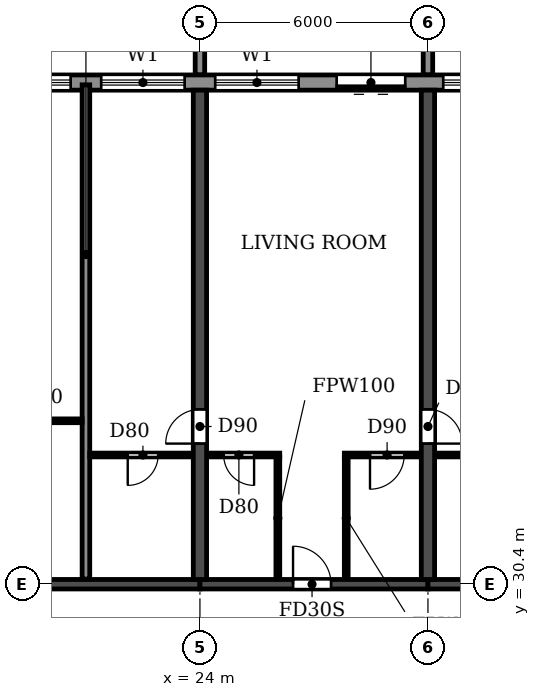
"""IFC4 building model, lengths in metres.
Left out: names, types, materials, properties, quantities, classifications, styles, units other than length and angle.
Written with IfcOpenShell. Run it as: python <this file> out.ifc"""

import sys

from ifc_helpers import new_model, si_unit, direction, frame, frame_2d, origin, place, context, subcontext, project, spatial, polyline, rectangle, outline, extrude, source, transform, mapped, element, fill, save


model = new_model("IFC4")
c1 = context("Model", 3, precision=1e-05, world=origin(), true_north=direction((0.0, 1.0)))
c2 = subcontext(c1, "Body", "Model", "MODEL_VIEW")
j1 = project(units=[si_unit("LENGTHUNIT", "METRE"), si_unit("PLANEANGLEUNIT", "RADIAN")], contexts=[c1])
p1 = place(None, origin())
s1 = spatial("IfcSite", under=j1, at=p1, CompositionType="ELEMENT")
p2 = place(p1, origin())
s2 = spatial("IfcBuilding", under=s1, at=p2, CompositionType="ELEMENT")
p3 = place(p2, frame((0.0, 0.0, 92.7)))
s3 = spatial("IfcBuildingStorey", under=s2, at=p3, CompositionType="ELEMENT", Elevation=92.7)
p4 = place(p3, frame((24.0, 30.525, 0.0), z_axis=(0.0, 0.0, 1.0), x_axis=(0.0, 1.0, 0.0)))
e1 = element("IfcWall", 1, at=p4, inside=s3, PredefinedType="SHEAR", context=c2, shape_type="SweptSolid", body=[
    extrude(rectangle(XDim=12.875, YDim=0.35, at=frame_2d((6.438, 0.0))), origin(), (0.0, 0.0, 1.0), 3.06),
])
p5 = place(p4, frame((3.575, 0.0, 0.0)))
e2 = element("IfcOpeningElement", 2, at=p5, cuts=e1, PredefinedType="OPENING", context=c2, shape_type="SweptSolid", body=[
    extrude(rectangle(XDim=0.9, YDim=2.1, at=frame_2d((0.45, 1.05))), frame((0.0, 0.185, 0.0), z_axis=(0.0, -1.0, 0.0), x_axis=(1.0, 0.0, 0.0)), (0.0, 0.0, 1.0), 0.37),
])
p6 = place(p3, frame((30.0, 30.525, 0.0), z_axis=(0.0, 0.0, 1.0), x_axis=(0.0, 1.0, 0.0)))
e3 = element("IfcWall", 3, at=p6, inside=s3, PredefinedType="SHEAR", context=c2, shape_type="SweptSolid", body=[
    extrude(rectangle(XDim=12.875, YDim=0.35, at=frame_2d((6.438, 0.0))), origin(), (0.0, 0.0, 1.0), 3.06),
])
p7 = place(p6, frame((3.575, 0.0, 0.0)))
e4 = element("IfcOpeningElement", 4, at=p7, cuts=e3, PredefinedType="OPENING", context=c2, shape_type="SweptSolid", body=[
    extrude(rectangle(XDim=0.9, YDim=2.1, at=frame_2d((0.45, 1.05))), frame((0.0, 0.185, 0.0), z_axis=(0.0, -1.0, 0.0), x_axis=(1.0, 0.0, 0.0)), (0.0, 0.0, 1.0), 0.37),
])
p8 = place(p3, frame((18.0, 30.4, 0.0), z_axis=(0.0, 0.0, 1.0), x_axis=(1.0, 0.0, 0.0)))
e5 = element("IfcWall", 5, at=p8, inside=s3, PredefinedType="SHEAR", context=c2, shape_type="SweptSolid", body=[
    extrude(rectangle(XDim=6.0, YDim=0.25, at=frame_2d((3.0, 0.0))), origin(), (0.0, 0.0, 1.0), 2.46),
])
p9 = place(p3, frame((24.0, 30.4, 0.0), z_axis=(0.0, 0.0, 1.0), x_axis=(1.0, 0.0, 0.0)))
e6 = element("IfcWall", 6, at=p9, inside=s3, PredefinedType="SHEAR", context=c2, shape_type="SweptSolid", body=[
    extrude(rectangle(XDim=6.0, YDim=0.25, at=frame_2d((3.0, 0.0))), origin(), (0.0, 0.0, 1.0), 2.46),
])
p10 = place(p9, frame((2.45, 0.0, 0.0)))
e7 = element("IfcOpeningElement", 7, at=p10, cuts=e6, PredefinedType="OPENING", context=c2, shape_type="SweptSolid", body=[
    extrude(rectangle(XDim=1.0, YDim=2.1, at=frame_2d((0.5, 1.05))), frame((0.0, 0.135, 0.0), z_axis=(0.0, -1.0, 0.0), x_axis=(1.0, 0.0, 0.0)), (0.0, 0.0, 1.0), 0.27),
])
p11 = place(p3, frame((30.0, 30.4, 0.0), z_axis=(0.0, 0.0, 1.0), x_axis=(1.0, 0.0, 0.0)))
e8 = element("IfcWall", 8, at=p11, inside=s3, PredefinedType="SHEAR", context=c2, shape_type="SweptSolid", body=[
    extrude(rectangle(XDim=6.0, YDim=0.25, at=frame_2d((3.0, 0.0))), origin(), (0.0, 0.0, 1.0), 2.46),
])
p12 = place(p3, frame((91.317, 43.6, 0.0), z_axis=(0.0, 0.0, 1.0), x_axis=(-1.0, 0.0, 0.0)))
e9 = element("IfcWall", 9, at=p12, inside=s3, PredefinedType="STANDARD", context=c2, shape_type="SweptSolid", body=[
    extrude(rectangle(XDim=80.634, YDim=0.4, at=frame_2d((40.317, 0.0))), origin(), (0.0, 0.0, 1.0), 3.06),
])
p13 = place(p12, frame((76.717, 0.0, 0.9)))
e10 = element("IfcOpeningElement", 10, at=p13, cuts=e9, PredefinedType="OPENING", context=c2, shape_type="SweptSolid", body=[
    extrude(rectangle(XDim=2.2, YDim=1.5, at=frame_2d((1.1, 0.75))), frame((0.0, 0.21, 0.0), z_axis=(0.0, -1.0, 0.0), x_axis=(1.0, 0.0, 0.0)), (0.0, 0.0, 1.0), 0.42),
])
p14 = place(p12, frame((73.917, 0.0, 0.0)))
e11 = element("IfcOpeningElement", 11, at=p14, cuts=e9, PredefinedType="OPENING", context=c2, shape_type="SweptSolid", body=[
    extrude(rectangle(XDim=1.8, YDim=2.4, at=frame_2d((0.9, 1.2))), frame((0.0, 0.21, 0.0), z_axis=(0.0, -1.0, 0.0), x_axis=(1.0, 0.0, 0.0)), (0.0, 0.0, 1.0), 0.42),
])
p15 = place(p12, frame((70.717, 0.0, 0.9)))
e12 = element("IfcOpeningElement", 12, at=p15, cuts=e9, PredefinedType="OPENING", context=c2, shape_type="SweptSolid", body=[
    extrude(rectangle(XDim=2.2, YDim=1.5, at=frame_2d((1.1, 0.75))), frame((0.0, 0.21, 0.0), z_axis=(0.0, -1.0, 0.0), x_axis=(1.0, 0.0, 0.0)), (0.0, 0.0, 1.0), 0.42),
])
p16 = place(p12, frame((67.717, 0.0, 0.9)))
e13 = element("IfcOpeningElement", 13, at=p16, cuts=e9, PredefinedType="OPENING", context=c2, shape_type="SweptSolid", body=[
    extrude(rectangle(XDim=2.2, YDim=1.5, at=frame_2d((1.1, 0.75))), frame((0.0, 0.21, 0.0), z_axis=(0.0, -1.0, 0.0), x_axis=(1.0, 0.0, 0.0)), (0.0, 0.0, 1.0), 0.42),
])
p17 = place(p12, frame((64.717, 0.0, 0.9)))
e14 = element("IfcOpeningElement", 14, at=p17, cuts=e9, PredefinedType="OPENING", context=c2, shape_type="SweptSolid", body=[
    extrude(rectangle(XDim=2.2, YDim=1.5, at=frame_2d((1.1, 0.75))), frame((0.0, 0.21, 0.0), z_axis=(0.0, -1.0, 0.0), x_axis=(1.0, 0.0, 0.0)), (0.0, 0.0, 1.0), 0.42),
])
p18 = place(p12, frame((61.917, 0.0, 0.0)))
e15 = element("IfcOpeningElement", 15, at=p18, cuts=e9, PredefinedType="OPENING", context=c2, shape_type="SweptSolid", body=[
    extrude(rectangle(XDim=1.8, YDim=2.4, at=frame_2d((0.9, 1.2))), frame((0.0, 0.21, 0.0), z_axis=(0.0, -1.0, 0.0), x_axis=(1.0, 0.0, 0.0)), (0.0, 0.0, 1.0), 0.42),
])
p19 = place(p12, frame((58.717, 0.0, 0.9)))
e16 = element("IfcOpeningElement", 16, at=p19, cuts=e9, PredefinedType="OPENING", context=c2, shape_type="SweptSolid", body=[
    extrude(rectangle(XDim=2.2, YDim=1.5, at=frame_2d((1.1, 0.75))), frame((0.0, 0.21, 0.0), z_axis=(0.0, -1.0, 0.0), x_axis=(1.0, 0.0, 0.0)), (0.0, 0.0, 1.0), 0.42),
])
p20 = place(p12, frame((55.717, 0.0, 0.9)))
e17 = element("IfcOpeningElement", 17, at=p20, cuts=e9, PredefinedType="OPENING", context=c2, shape_type="SweptSolid", body=[
    extrude(rectangle(XDim=2.2, YDim=1.5, at=frame_2d((1.1, 0.75))), frame((0.0, 0.21, 0.0), z_axis=(0.0, -1.0, 0.0), x_axis=(1.0, 0.0, 0.0)), (0.0, 0.0, 1.0), 0.42),
])
p21 = place(p12, frame((52.917, 0.0, 0.0)))
e18 = element("IfcOpeningElement", 18, at=p21, cuts=e9, PredefinedType="OPENING", context=c2, shape_type="SweptSolid", body=[
    extrude(rectangle(XDim=1.8, YDim=2.4, at=frame_2d((0.9, 1.2))), frame((0.0, 0.21, 0.0), z_axis=(0.0, -1.0, 0.0), x_axis=(1.0, 0.0, 0.0)), (0.0, 0.0, 1.0), 0.42),
])
p22 = place(p12, frame((49.717, 0.0, 0.9)))
e19 = element("IfcOpeningElement", 19, at=p22, cuts=e9, PredefinedType="OPENING", context=c2, shape_type="SweptSolid", body=[
    extrude(rectangle(XDim=2.2, YDim=1.5, at=frame_2d((1.1, 0.75))), frame((0.0, 0.21, 0.0), z_axis=(0.0, -1.0, 0.0), x_axis=(1.0, 0.0, 0.0)), (0.0, 0.0, 1.0), 0.42),
])
p23 = place(p12, frame((46.717, 0.0, 0.9)))
e20 = element("IfcOpeningElement", 20, at=p23, cuts=e9, PredefinedType="OPENING", context=c2, shape_type="SweptSolid", body=[
    extrude(rectangle(XDim=2.2, YDim=1.5, at=frame_2d((1.1, 0.75))), frame((0.0, 0.21, 0.0), z_axis=(0.0, -1.0, 0.0), x_axis=(1.0, 0.0, 0.0)), (0.0, 0.0, 1.0), 0.42),
])
p24 = place(p12, frame((43.717, 0.0, 0.9)))
e21 = element("IfcOpeningElement", 21, at=p24, cuts=e9, PredefinedType="OPENING", context=c2, shape_type="SweptSolid", body=[
    extrude(rectangle(XDim=2.2, YDim=1.5, at=frame_2d((1.1, 0.75))), frame((0.0, 0.21, 0.0), z_axis=(0.0, -1.0, 0.0), x_axis=(1.0, 0.0, 0.0)), (0.0, 0.0, 1.0), 0.42),
])
p25 = place(p12, frame((40.717, 0.0, 0.9)))
e22 = element("IfcOpeningElement", 22, at=p25, cuts=e9, PredefinedType="OPENING", context=c2, shape_type="SweptSolid", body=[
    extrude(rectangle(XDim=2.2, YDim=1.5, at=frame_2d((1.1, 0.75))), frame((0.0, 0.21, 0.0), z_axis=(0.0, -1.0, 0.0), x_axis=(1.0, 0.0, 0.0)), (0.0, 0.0, 1.0), 0.42),
])
p26 = place(p12, frame((37.917, 0.0, 0.0)))
e23 = element("IfcOpeningElement", 23, at=p26, cuts=e9, PredefinedType="OPENING", context=c2, shape_type="SweptSolid", body=[
    extrude(rectangle(XDim=1.8, YDim=2.4, at=frame_2d((0.9, 1.2))), frame((0.0, 0.21, 0.0), z_axis=(0.0, -1.0, 0.0), x_axis=(1.0, 0.0, 0.0)), (0.0, 0.0, 1.0), 0.42),
])
p27 = place(p12, frame((34.917, 0.0, 0.0)))
e24 = element("IfcOpeningElement", 24, at=p27, cuts=e9, PredefinedType="OPENING", context=c2, shape_type="SweptSolid", body=[
    extrude(rectangle(XDim=1.8, YDim=2.4, at=frame_2d((0.9, 1.2))), frame((0.0, 0.21, 0.0), z_axis=(0.0, -1.0, 0.0), x_axis=(1.0, 0.0, 0.0)), (0.0, 0.0, 1.0), 0.42),
])
p28 = place(p12, frame((31.717, 0.0, 0.9)))
e25 = element("IfcOpeningElement", 25, at=p28, cuts=e9, PredefinedType="OPENING", context=c2, shape_type="SweptSolid", body=[
    extrude(rectangle(XDim=2.2, YDim=1.5, at=frame_2d((1.1, 0.75))), frame((0.0, 0.21, 0.0), z_axis=(0.0, -1.0, 0.0), x_axis=(1.0, 0.0, 0.0)), (0.0, 0.0, 1.0), 0.42),
])
p29 = place(p12, frame((28.717, 0.0, 0.9)))
e26 = element("IfcOpeningElement", 26, at=p29, cuts=e9, PredefinedType="OPENING", context=c2, shape_type="SweptSolid", body=[
    extrude(rectangle(XDim=2.2, YDim=1.5, at=frame_2d((1.1, 0.75))), frame((0.0, 0.21, 0.0), z_axis=(0.0, -1.0, 0.0), x_axis=(1.0, 0.0, 0.0)), (0.0, 0.0, 1.0), 0.42),
])
p30 = place(p12, frame((25.717, 0.0, 0.9)))
e27 = element("IfcOpeningElement", 27, at=p30, cuts=e9, PredefinedType="OPENING", context=c2, shape_type="SweptSolid", body=[
    extrude(rectangle(XDim=2.2, YDim=1.5, at=frame_2d((1.1, 0.75))), frame((0.0, 0.21, 0.0), z_axis=(0.0, -1.0, 0.0), x_axis=(1.0, 0.0, 0.0)), (0.0, 0.0, 1.0), 0.42),
])
p31 = place(p12, frame((22.717, 0.0, 0.9)))
e28 = element("IfcOpeningElement", 28, at=p31, cuts=e9, PredefinedType="OPENING", context=c2, shape_type="SweptSolid", body=[
    extrude(rectangle(XDim=2.2, YDim=1.5, at=frame_2d((1.1, 0.75))), frame((0.0, 0.21, 0.0), z_axis=(0.0, -1.0, 0.0), x_axis=(1.0, 0.0, 0.0)), (0.0, 0.0, 1.0), 0.42),
])
p32 = place(p12, frame((19.917, 0.0, 0.0)))
e29 = element("IfcOpeningElement", 29, at=p32, cuts=e9, PredefinedType="OPENING", context=c2, shape_type="SweptSolid", body=[
    extrude(rectangle(XDim=1.8, YDim=2.4, at=frame_2d((0.9, 1.2))), frame((0.0, 0.21, 0.0), z_axis=(0.0, -1.0, 0.0), x_axis=(1.0, 0.0, 0.0)), (0.0, 0.0, 1.0), 0.42),
])
p33 = place(p12, frame((16.717, 0.0, 0.9)))
e30 = element("IfcOpeningElement", 30, at=p33, cuts=e9, PredefinedType="OPENING", context=c2, shape_type="SweptSolid", body=[
    extrude(rectangle(XDim=2.2, YDim=1.5, at=frame_2d((1.1, 0.75))), frame((0.0, 0.21, 0.0), z_axis=(0.0, -1.0, 0.0), x_axis=(1.0, 0.0, 0.0)), (0.0, 0.0, 1.0), 0.42),
])
p34 = place(p12, frame((13.917, 0.0, 0.0)))
e31 = element("IfcOpeningElement", 31, at=p34, cuts=e9, PredefinedType="OPENING", context=c2, shape_type="SweptSolid", body=[
    extrude(rectangle(XDim=1.8, YDim=2.4, at=frame_2d((0.9, 1.2))), frame((0.0, 0.21, 0.0), z_axis=(0.0, -1.0, 0.0), x_axis=(1.0, 0.0, 0.0)), (0.0, 0.0, 1.0), 0.42),
])
p35 = place(p12, frame((10.717, 0.0, 0.9)))
e32 = element("IfcOpeningElement", 32, at=p35, cuts=e9, PredefinedType="OPENING", context=c2, shape_type="SweptSolid", body=[
    extrude(rectangle(XDim=2.2, YDim=1.5, at=frame_2d((1.1, 0.75))), frame((0.0, 0.21, 0.0), z_axis=(0.0, -1.0, 0.0), x_axis=(1.0, 0.0, 0.0)), (0.0, 0.0, 1.0), 0.42),
])
p36 = place(p12, frame((7.917, 0.0, 0.0)))
e33 = element("IfcOpeningElement", 33, at=p36, cuts=e9, PredefinedType="OPENING", context=c2, shape_type="SweptSolid", body=[
    extrude(rectangle(XDim=1.8, YDim=2.4, at=frame_2d((0.9, 1.2))), frame((0.0, 0.21, 0.0), z_axis=(0.0, -1.0, 0.0), x_axis=(1.0, 0.0, 0.0)), (0.0, 0.0, 1.0), 0.42),
])
p37 = place(p12, frame((4.717, 0.0, 0.9)))
e34 = element("IfcOpeningElement", 34, at=p37, cuts=e9, PredefinedType="OPENING", context=c2, shape_type="SweptSolid", body=[
    extrude(rectangle(XDim=2.2, YDim=1.5, at=frame_2d((1.1, 0.75))), frame((0.0, 0.21, 0.0), z_axis=(0.0, -1.0, 0.0), x_axis=(1.0, 0.0, 0.0)), (0.0, 0.0, 1.0), 0.42),
])
p38 = place(p12, frame((1.917, 0.0, 0.0)))
e35 = element("IfcOpeningElement", 35, at=p38, cuts=e9, PredefinedType="OPENING", context=c2, shape_type="SweptSolid", body=[
    extrude(rectangle(XDim=1.8, YDim=2.4, at=frame_2d((0.9, 1.2))), frame((0.0, 0.21, 0.0), z_axis=(0.0, -1.0, 0.0), x_axis=(1.0, 0.0, 0.0)), (0.0, 0.0, 1.0), 0.42),
])
m1 = source(origin(), c2, "Body", "SweptSolid", [
    extrude(outline(polyline([(0.0, 0.0), (0.25, 0.0), (0.25, 3.1), (0.0, 3.1), (0.0, 0.0)])), origin(), (0.0, 0.0, 1.0), 3.1),
])
for number, where in (
    (36, (23.875, 43.8, 0.0)),
    (37, (29.875, 43.8, 0.0)),
):
    element("IfcWall", number, at=place(p3, frame(where)), inside=s3, PredefinedType="STANDARD", context=c2, shape_type="MappedRepresentation", body=[
        mapped(m1, transform((0.0, 0.0, 0.0))),
    ])
p39 = place(p3, frame((21.0, 30.535, 0.0), z_axis=(0.0, 0.0, 1.0), x_axis=(0.0, 1.0, 0.0)))
e38 = element("IfcWall", 38, at=p39, inside=s3, PredefinedType="PARTITIONING", context=c2, shape_type="SweptSolid", body=[
    extrude(rectangle(XDim=13.005, YDim=0.2, at=frame_2d((6.502, 0.0))), origin(), (0.0, 0.0, 1.0), 3.06),
])
p40 = place(p3, frame((21.1, 33.8, 0.0), z_axis=(0.0, 0.0, 1.0), x_axis=(1.0, 0.0, 0.0)))
e39 = element("IfcWall", 39, at=p40, inside=s3, PredefinedType="PARTITIONING", context=c2, shape_type="SweptSolid", body=[
    extrude(rectangle(XDim=2.715, YDim=0.1, at=frame_2d((1.357, 0.0))), origin(), (0.0, 0.0, 1.0), 3.06),
])
p41 = place(p40, frame((1.0, 0.0, 0.0)))
e40 = element("IfcOpeningElement", 40, at=p41, cuts=e39, PredefinedType="OPENING", context=c2, shape_type="SweptSolid", body=[
    extrude(rectangle(XDim=0.8, YDim=2.1, at=frame_2d((0.4, 1.05))), frame((0.0, 0.06, 0.0), z_axis=(0.0, -1.0, 0.0), x_axis=(1.0, 0.0, 0.0)), (0.0, 0.0, 1.0), 0.12),
])
p42 = place(p3, frame((24.185, 33.8, 0.0), z_axis=(0.0, 0.0, 1.0), x_axis=(1.0, 0.0, 0.0)))
e41 = element("IfcWall", 41, at=p42, inside=s3, PredefinedType="PARTITIONING", context=c2, shape_type="SweptSolid", body=[
    extrude(rectangle(XDim=1.915, YDim=0.1, at=frame_2d((0.958, 0.0))), origin(), (0.0, 0.0, 1.0), 3.06),
])
p43 = place(p42, frame((0.44, 0.0, 0.0)))
e42 = element("IfcOpeningElement", 42, at=p43, cuts=e41, PredefinedType="OPENING", context=c2, shape_type="SweptSolid", body=[
    extrude(rectangle(XDim=0.8, YDim=2.1, at=frame_2d((0.4, 1.05))), frame((0.0, 0.06, 0.0), z_axis=(0.0, -1.0, 0.0), x_axis=(1.0, 0.0, 0.0)), (0.0, 0.0, 1.0), 0.12),
])
p44 = place(p3, frame((27.8, 33.8, 0.0), z_axis=(0.0, 0.0, 1.0), x_axis=(1.0, 0.0, 0.0)))
e43 = element("IfcWall", 43, at=p44, inside=s3, PredefinedType="PARTITIONING", context=c2, shape_type="SweptSolid", body=[
    extrude(rectangle(XDim=2.015, YDim=0.1, at=frame_2d((1.007, 0.0))), origin(), (0.0, 0.0, 1.0), 3.06),
])
p45 = place(p44, frame((0.675, 0.0, 0.0)))
e44 = element("IfcOpeningElement", 44, at=p45, cuts=e43, PredefinedType="OPENING", context=c2, shape_type="SweptSolid", body=[
    extrude(rectangle(XDim=0.9, YDim=2.1, at=frame_2d((0.45, 1.05))), frame((0.0, 0.06, 0.0), z_axis=(0.0, -1.0, 0.0), x_axis=(1.0, 0.0, 0.0)), (0.0, 0.0, 1.0), 0.12),
])
p46 = place(p3, frame((30.185, 33.8, 0.0), z_axis=(0.0, 0.0, 1.0), x_axis=(1.0, 0.0, 0.0)))
e45 = element("IfcWall", 45, at=p46, inside=s3, PredefinedType="PARTITIONING", context=c2, shape_type="SweptSolid", body=[
    extrude(rectangle(XDim=2.715, YDim=0.1, at=frame_2d((1.357, 0.0))), origin(), (0.0, 0.0, 1.0), 3.06),
])
p47 = place(p46, frame((0.915, 0.0, 0.0)))
e46 = element("IfcOpeningElement", 46, at=p47, cuts=e45, PredefinedType="OPENING", context=c2, shape_type="SweptSolid", body=[
    extrude(rectangle(XDim=0.8, YDim=2.1, at=frame_2d((0.4, 1.05))), frame((0.0, 0.06, 0.0), z_axis=(0.0, -1.0, 0.0), x_axis=(1.0, 0.0, 0.0)), (0.0, 0.0, 1.0), 0.12),
])
p48 = place(p3, frame((18.185, 34.7, 0.0), z_axis=(0.0, 0.0, 1.0), x_axis=(1.0, 0.0, 0.0)))
e47 = element("IfcWall", 47, at=p48, inside=s3, PredefinedType="PARTITIONING", context=c2, shape_type="SweptSolid", body=[
    extrude(rectangle(XDim=2.715, YDim=0.1, at=frame_2d((1.357, 0.0))), origin(), (0.0, 0.0, 1.0), 3.06),
])
p49 = place(p48, frame((0.915, 0.0, 0.0)))
e48 = element("IfcOpeningElement", 48, at=p49, cuts=e47, PredefinedType="OPENING", context=c2, shape_type="SweptSolid", body=[
    extrude(rectangle(XDim=0.8, YDim=2.1, at=frame_2d((0.4, 1.05))), frame((0.0, 0.06, 0.0), z_axis=(0.0, -1.0, 0.0), x_axis=(1.0, 0.0, 0.0)), (0.0, 0.0, 1.0), 0.12),
])
for number, where, z_axis, x_axis in (
    (49, (26.05, 30.535, 0.0), (0.0, 0.0, 1.0), (0.0, 1.0, 0.0)),
    (50, (27.85, 30.535, 0.0), (0.0, 0.0, 1.0), (0.0, 1.0, 0.0)),
):
    element("IfcWall", number, at=place(p3, frame(where, z_axis=z_axis, x_axis=x_axis)), inside=s3, PredefinedType="PARTITIONING", context=c2, shape_type="SweptSolid", body=[
        extrude(rectangle(XDim=3.215, YDim=0.1, at=frame_2d((1.607, 0.0))), origin(), (0.0, 0.0, 1.0), 3.06),
    ])
p50 = place(p15, origin())
e51 = element("IfcWindow", 51, at=p50, inside=s3, PartitioningType="DOUBLE_PANEL_HORIZONTAL", PredefinedType="WINDOW", context=c2, shape_type="SweptSolid", body=[
    extrude(rectangle(XDim=2.2, YDim=1.5, at=frame_2d((1.1, 0.75))), frame((0.0, 0.03, 0.0), z_axis=(0.0, -1.0, 0.0), x_axis=(1.0, 0.0, 0.0)), (0.0, 0.0, 1.0), 0.06),
])
fill(e12, e51)
p51 = place(p16, origin())
e52 = element("IfcWindow", 52, at=p51, inside=s3, PartitioningType="DOUBLE_PANEL_HORIZONTAL", PredefinedType="WINDOW", context=c2, shape_type="SweptSolid", body=[
    extrude(rectangle(XDim=2.2, YDim=1.5, at=frame_2d((1.1, 0.75))), frame((0.0, 0.03, 0.0), z_axis=(0.0, -1.0, 0.0), x_axis=(1.0, 0.0, 0.0)), (0.0, 0.0, 1.0), 0.06),
])
fill(e13, e52)
p52 = place(p17, origin())
e53 = element("IfcWindow", 53, at=p52, inside=s3, PartitioningType="DOUBLE_PANEL_HORIZONTAL", PredefinedType="WINDOW", context=c2, shape_type="SweptSolid", body=[
    extrude(rectangle(XDim=2.2, YDim=1.5, at=frame_2d((1.1, 0.75))), frame((0.0, 0.03, 0.0), z_axis=(0.0, -1.0, 0.0), x_axis=(1.0, 0.0, 0.0)), (0.0, 0.0, 1.0), 0.06),
])
fill(e14, e53)
p53 = place(p18, origin())
e54 = element("IfcDoor", 54, at=p53, inside=s3, OperationType="DOUBLE_DOOR_SLIDING", PredefinedType="DOOR", context=c2, shape_type="SweptSolid", body=[
    extrude(rectangle(XDim=1.8, YDim=2.4, at=frame_2d((0.9, 1.2))), frame((0.0, 0.025, 0.0), z_axis=(0.0, -1.0, 0.0), x_axis=(1.0, 0.0, 0.0)), (0.0, 0.0, 1.0), 0.05),
])
fill(e15, e54)
p54 = place(p19, origin())
e55 = element("IfcWindow", 55, at=p54, inside=s3, PartitioningType="DOUBLE_PANEL_HORIZONTAL", PredefinedType="WINDOW", context=c2, shape_type="SweptSolid", body=[
    extrude(rectangle(XDim=2.2, YDim=1.5, at=frame_2d((1.1, 0.75))), frame((0.0, 0.03, 0.0), z_axis=(0.0, -1.0, 0.0), x_axis=(1.0, 0.0, 0.0)), (0.0, 0.0, 1.0), 0.06),
])
fill(e16, e55)
p55 = place(p41, frame((0.8, 0.0, 0.0), z_axis=(0.0, 0.0, 1.0), x_axis=(-1.0, 0.0, 0.0)))
e56 = element("IfcDoor", 56, at=p55, inside=s3, OperationType="SINGLE_SWING_RIGHT", PredefinedType="DOOR", context=c2, shape_type="SweptSolid", body=[
    extrude(rectangle(XDim=0.8, YDim=2.1, at=frame_2d((0.4, 1.05))), frame((0.0, 0.025, 0.0), z_axis=(0.0, -1.0, 0.0), x_axis=(1.0, 0.0, 0.0)), (0.0, 0.0, 1.0), 0.05),
])
fill(e40, e56)
p56 = place(p5, origin())
e57 = element("IfcDoor", 57, at=p56, inside=s3, OperationType="SINGLE_SWING_LEFT", PredefinedType="DOOR", context=c2, shape_type="SweptSolid", body=[
    extrude(rectangle(XDim=0.9, YDim=2.1, at=frame_2d((0.45, 1.05))), frame((0.0, 0.025, 0.0), z_axis=(0.0, -1.0, 0.0), x_axis=(1.0, 0.0, 0.0)), (0.0, 0.0, 1.0), 0.05),
])
fill(e2, e57)
p57 = place(p43, frame((0.8, 0.0, 0.0), z_axis=(0.0, 0.0, 1.0), x_axis=(-1.0, 0.0, 0.0)))
e58 = element("IfcDoor", 58, at=p57, inside=s3, OperationType="SINGLE_SWING_LEFT", PredefinedType="DOOR", context=c2, shape_type="SweptSolid", body=[
    extrude(rectangle(XDim=0.8, YDim=2.1, at=frame_2d((0.4, 1.05))), frame((0.0, 0.025, 0.0), z_axis=(0.0, -1.0, 0.0), x_axis=(1.0, 0.0, 0.0)), (0.0, 0.0, 1.0), 0.05),
])
fill(e42, e58)
p58 = place(p10, origin())
e59 = element("IfcDoor", 59, at=p58, inside=s3, OperationType="SINGLE_SWING_LEFT", PredefinedType="DOOR", context=c2, shape_type="SweptSolid", body=[
    extrude(rectangle(XDim=1.0, YDim=2.1, at=frame_2d((0.5, 1.05))), frame((0.0, 0.025, 0.0), z_axis=(0.0, -1.0, 0.0), x_axis=(1.0, 0.0, 0.0)), (0.0, 0.0, 1.0), 0.05),
])
fill(e7, e59)
p59 = place(p45, frame((0.9, 0.0, 0.0), z_axis=(0.0, 0.0, 1.0), x_axis=(-1.0, 0.0, 0.0)))
e60 = element("IfcDoor", 60, at=p59, inside=s3, OperationType="SINGLE_SWING_RIGHT", PredefinedType="DOOR", context=c2, shape_type="SweptSolid", body=[
    extrude(rectangle(XDim=0.9, YDim=2.1, at=frame_2d((0.45, 1.05))), frame((0.0, 0.025, 0.0), z_axis=(0.0, -1.0, 0.0), x_axis=(1.0, 0.0, 0.0)), (0.0, 0.0, 1.0), 0.05),
])
fill(e44, e60)
p60 = place(p7, frame((0.9, 0.0, 0.0), z_axis=(0.0, 0.0, 1.0), x_axis=(-1.0, 0.0, 0.0)))
e61 = element("IfcDoor", 61, at=p60, inside=s3, OperationType="SINGLE_SWING_RIGHT", PredefinedType="DOOR", context=c2, shape_type="SweptSolid", body=[
    extrude(rectangle(XDim=0.9, YDim=2.1, at=frame_2d((0.45, 1.05))), frame((0.0, 0.025, 0.0), z_axis=(0.0, -1.0, 0.0), x_axis=(1.0, 0.0, 0.0)), (0.0, 0.0, 1.0), 0.05),
])
fill(e4, e61)
save(model, sys.argv[1])
